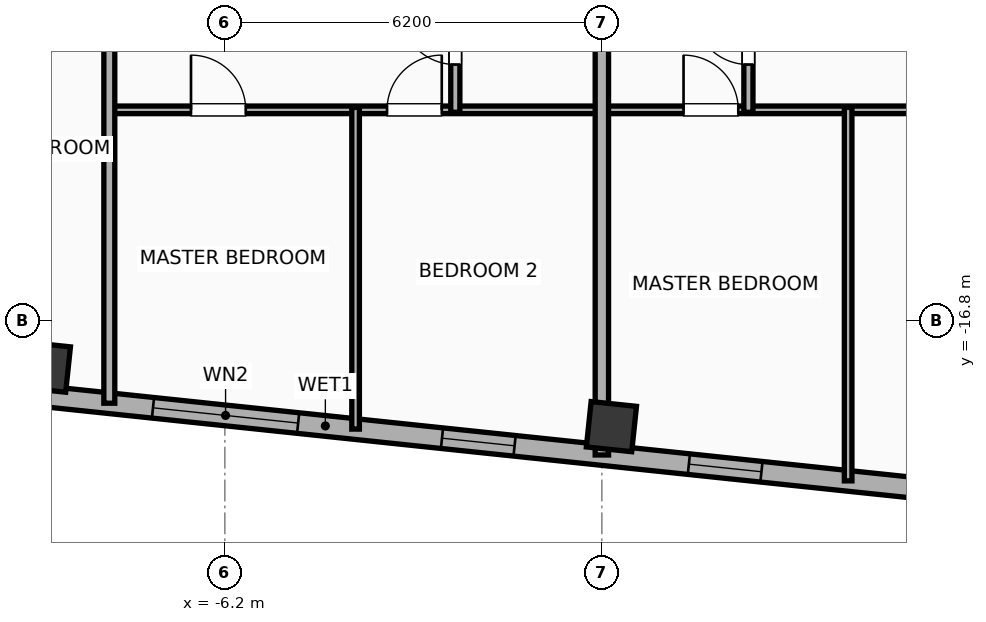
"""IFC4 building model, lengths in metres.
Left out: names, types, materials, properties, quantities, classifications, styles, units other than length and angle.
Written with IfcOpenShell. Run it as: python <this file> out.ifc"""

import sys

from ifc_helpers import new_model, si_unit, direction, frame, frame_2d, origin, origin_2d, place, context, subcontext, project, spatial, rectangle, hollow_rectangle, extrude, element, fill, save


model = new_model("IFC4")
c1 = context("Model", 3, precision=1e-05, world=origin(), true_north=direction((0.0, 1.0)))
c2 = subcontext(c1, "Body", "Model", "MODEL_VIEW")
j1 = project(units=[si_unit("LENGTHUNIT", "METRE"), si_unit("PLANEANGLEUNIT", "RADIAN")], contexts=[c1])
p1 = place(None, origin())
s1 = spatial("IfcSite", under=j1, at=p1, CompositionType="ELEMENT")
p2 = place(p1, origin())
s2 = spatial("IfcBuilding", under=s1, at=p2, CompositionType="ELEMENT")
p3 = place(p2, frame((0.0, 0.0, 271.7)))
s3 = spatial("IfcBuildingStorey", under=s2, at=p3, CompositionType="ELEMENT", Elevation=271.7)
for number, where, z_axis, x_axis in (
    (1, (-9.152, -17.561, 0.0), (0.0, 0.0, 1.0), (0.995, -0.105, 0.0)),
    (2, (0.157, -18.54, 0.0), (0.0, 0.0, 1.0), (0.995, -0.105, 0.0)),
):
    element("IfcColumn", number, at=place(p3, frame(where, z_axis=z_axis, x_axis=x_axis)), inside=s3, PredefinedType="COLUMN", context=c2, shape_type="SweptSolid", body=[
        extrude(hollow_rectangle(XDim=0.75, YDim=0.75, WallThickness=0.025, at=origin_2d()), origin(), (0.0, 0.0, 1.0), 3.9),
    ])
p4 = place(p3, frame((18.708, -20.972, 0.0), z_axis=(0.0, 0.0, 1.0), x_axis=(-0.994521888554, 0.104528528102, 0.0)))
e3 = element("IfcWall", 3, at=p4, inside=s3, PredefinedType="ELEMENTEDWALL", context=c2, shape_type="SweptSolid", body=[
    extrude(rectangle(XDim=46.766, YDim=0.34, at=frame_2d((23.383, 0.0))), origin(), (0.0, 0.0, 1.0), 3.65),
])
p5 = place(p4, frame((23.833, 0.0, 0.75)))
e4 = element("IfcOpeningElement", 4, at=p5, cuts=e3, PredefinedType="OPENING", context=c2, shape_type="SweptSolid", body=[
    extrude(rectangle(XDim=2.4, YDim=2.1, at=frame_2d((1.2, 1.05))), frame((0.0, 0.18, 0.0), z_axis=(0.0, -1.0, 0.0), x_axis=(1.0, 0.0, 0.0)), (0.0, 0.0, 1.0), 0.36),
])
p6 = place(p4, frame((38.622, 0.0, 0.75)))
e5 = element("IfcOpeningElement", 5, at=p6, cuts=e3, PredefinedType="OPENING", context=c2, shape_type="SweptSolid", body=[
    extrude(rectangle(XDim=2.4, YDim=2.1, at=frame_2d((1.2, 1.05))), frame((0.0, 0.18, 0.0), z_axis=(0.0, -1.0, 0.0), x_axis=(1.0, 0.0, 0.0)), (0.0, 0.0, 1.0), 0.36),
])
p7 = place(p4, frame((44.402, 0.0, 0.75)))
e6 = element("IfcOpeningElement", 6, at=p7, cuts=e3, PredefinedType="OPENING", context=c2, shape_type="SweptSolid", body=[
    extrude(rectangle(XDim=1.2, YDim=2.05, at=frame_2d((0.6, 1.025))), frame((0.0, 0.18, 0.0), z_axis=(0.0, -1.0, 0.0), x_axis=(1.0, 0.0, 0.0)), (0.0, 0.0, 1.0), 0.36),
])
p8 = place(p4, frame((42.419, 0.0, 0.75)))
e7 = element("IfcOpeningElement", 7, at=p8, cuts=e3, PredefinedType="OPENING", context=c2, shape_type="SweptSolid", body=[
    extrude(rectangle(XDim=1.2, YDim=2.05, at=frame_2d((0.6, 1.025))), frame((0.0, 0.18, 0.0), z_axis=(0.0, -1.0, 0.0), x_axis=(1.0, 0.0, 0.0)), (0.0, 0.0, 1.0), 0.36),
])
p9 = place(p4, frame((34.933, 0.0, 0.75)))
e8 = element("IfcOpeningElement", 8, at=p9, cuts=e3, PredefinedType="OPENING", context=c2, shape_type="SweptSolid", body=[
    extrude(rectangle(XDim=1.2, YDim=2.05, at=frame_2d((0.6, 1.025))), frame((0.0, 0.18, 0.0), z_axis=(0.0, -1.0, 0.0), x_axis=(1.0, 0.0, 0.0)), (0.0, 0.0, 1.0), 0.36),
])
p10 = place(p4, frame((28.692, 0.0, 0.75)))
e9 = element("IfcOpeningElement", 9, at=p10, cuts=e3, PredefinedType="OPENING", context=c2, shape_type="SweptSolid", body=[
    extrude(rectangle(XDim=1.2, YDim=2.05, at=frame_2d((0.6, 1.025))), frame((0.0, 0.18, 0.0), z_axis=(0.0, -1.0, 0.0), x_axis=(1.0, 0.0, 0.0)), (0.0, 0.0, 1.0), 0.36),
])
p11 = place(p4, frame((30.957, 0.0, 0.75)))
e10 = element("IfcOpeningElement", 10, at=p11, cuts=e3, PredefinedType="OPENING", context=c2, shape_type="SweptSolid", body=[
    extrude(rectangle(XDim=1.2, YDim=2.05, at=frame_2d((0.6, 1.025))), frame((0.0, 0.18, 0.0), z_axis=(0.0, -1.0, 0.0), x_axis=(1.0, 0.0, 0.0)), (0.0, 0.0, 1.0), 0.36),
])
p12 = place(p4, frame((7.492, 0.0, 0.75)))
e11 = element("IfcOpeningElement", 11, at=p12, cuts=e3, PredefinedType="OPENING", context=c2, shape_type="SweptSolid", body=[
    extrude(rectangle(XDim=1.2, YDim=2.05, at=frame_2d((0.6, 1.025))), frame((0.0, 0.18, 0.0), z_axis=(0.0, -1.0, 0.0), x_axis=(1.0, 0.0, 0.0)), (0.0, 0.0, 1.0), 0.36),
])
p13 = place(p4, frame((4.141, 0.0, 0.75)))
e12 = element("IfcOpeningElement", 12, at=p13, cuts=e3, PredefinedType="OPENING", context=c2, shape_type="SweptSolid", body=[
    extrude(rectangle(XDim=1.2, YDim=2.05, at=frame_2d((0.6, 1.025))), frame((0.0, 0.18, 0.0), z_axis=(0.0, -1.0, 0.0), x_axis=(1.0, 0.0, 0.0)), (0.0, 0.0, 1.0), 0.36),
])
p14 = place(p4, frame((1.36, 0.0, 0.75)))
e13 = element("IfcOpeningElement", 13, at=p14, cuts=e3, PredefinedType="OPENING", context=c2, shape_type="SweptSolid", body=[
    extrude(rectangle(XDim=1.2, YDim=2.05, at=frame_2d((0.6, 1.025))), frame((0.0, 0.18, 0.0), z_axis=(0.0, -1.0, 0.0), x_axis=(1.0, 0.0, 0.0)), (0.0, 0.0, 1.0), 0.36),
])
p15 = place(p4, frame((20.254, 0.0, 0.75)))
e14 = element("IfcOpeningElement", 14, at=p15, cuts=e3, PredefinedType="OPENING", context=c2, shape_type="SweptSolid", body=[
    extrude(rectangle(XDim=1.2, YDim=2.05, at=frame_2d((0.6, 1.025))), frame((0.0, 0.18, 0.0), z_axis=(0.0, -1.0, 0.0), x_axis=(1.0, 0.0, 0.0)), (0.0, 0.0, 1.0), 0.36),
])
p16 = place(p4, frame((16.172, 0.0, 0.75)))
e15 = element("IfcOpeningElement", 15, at=p16, cuts=e3, PredefinedType="OPENING", context=c2, shape_type="SweptSolid", body=[
    extrude(rectangle(XDim=1.2, YDim=2.05, at=frame_2d((0.6, 1.025))), frame((0.0, 0.18, 0.0), z_axis=(0.0, -1.0, 0.0), x_axis=(1.0, 0.0, 0.0)), (0.0, 0.0, 1.0), 0.36),
])
p17 = place(p4, frame((12.11, 0.0, 0.75)))
e16 = element("IfcOpeningElement", 16, at=p17, cuts=e3, PredefinedType="OPENING", context=c2, shape_type="SweptSolid", body=[
    extrude(rectangle(XDim=1.2, YDim=2.05, at=frame_2d((0.6, 1.025))), frame((0.0, 0.18, 0.0), z_axis=(0.0, -1.0, 0.0), x_axis=(1.0, 0.0, 0.0)), (0.0, 0.0, 1.0), 0.36),
])
p18 = place(p3, frame((-8.08, -13.33, 0.0), z_axis=(0.0, 0.0, 1.0), x_axis=(1.0, 0.0, 0.0)))
e17 = element("IfcWall", 17, at=p18, inside=s3, PredefinedType="PARTITIONING", context=c2, shape_type="SweptSolid", body=[
    extrude(rectangle(XDim=8.06, YDim=0.125, at=frame_2d((4.03, 0.0))), origin(), (0.0, 0.0, 1.0), 3.65),
])
p19 = place(p18, frame((1.323, 0.0, 0.0)))
e18 = element("IfcOpeningElement", 18, at=p19, cuts=e17, PredefinedType="OPENING", context=c2, shape_type="SweptSolid", body=[
    extrude(rectangle(XDim=0.9, YDim=2.05, at=frame_2d((0.45, 1.025))), frame((0.0, 0.073, 0.0), z_axis=(0.0, -1.0, 0.0), x_axis=(1.0, 0.0, 0.0)), (0.0, 0.0, 1.0), 0.145),
])
p20 = place(p18, frame((4.547, 0.0, 0.0)))
e19 = element("IfcOpeningElement", 19, at=p20, cuts=e17, PredefinedType="OPENING", context=c2, shape_type="SweptSolid", body=[
    extrude(rectangle(XDim=0.9, YDim=2.05, at=frame_2d((0.45, 1.025))), frame((0.0, 0.073, 0.0), z_axis=(0.0, -1.0, 0.0), x_axis=(1.0, 0.0, 0.0)), (0.0, 0.0, 1.0), 0.145),
])
p21 = place(p3, frame((-2.41, -13.37, 0.0), z_axis=(0.0, 0.0, 1.0), x_axis=(0.0, 1.0, 0.0)))
e20 = element("IfcWall", 20, at=p21, inside=s3, PredefinedType="PLUMBINGWALL", context=c2, shape_type="SweptSolid", body=[
    extrude(rectangle(XDim=2.47, YDim=0.15, at=frame_2d((1.235, 0.0))), origin(), (0.0, 0.0, 1.0), 3.65),
])
p22 = place(p21, frame((0.785, 0.0, 0.0)))
e21 = element("IfcOpeningElement", 21, at=p22, cuts=e20, PredefinedType="OPENING", context=c2, shape_type="SweptSolid", body=[
    extrude(rectangle(XDim=0.9, YDim=2.05, at=frame_2d((0.45, 1.025))), frame((0.0, 0.085, 0.0), z_axis=(0.0, -1.0, 0.0), x_axis=(1.0, 0.0, 0.0)), (0.0, 0.0, 1.0), 0.17),
])
p23 = place(p3, frame((-4.05, -18.58, 0.0), z_axis=(0.0, 0.0, 1.0), x_axis=(0.0, 1.0, 0.0)))
e22 = element("IfcWall", 22, at=p23, inside=s3, PredefinedType="PARTITIONING", context=c2, shape_type="SweptSolid", body=[
    extrude(rectangle(XDim=5.29, YDim=0.125, at=frame_2d((2.645, 0.0))), origin(), (0.0, 0.0, 1.0), 3.65),
])
p24 = place(p3, frame((-8.1, -18.155, 0.0), z_axis=(0.0, 0.0, 1.0), x_axis=(0.0, 1.0, 0.0)))
e23 = element("IfcWall", 23, at=p24, inside=s3, PredefinedType="PARTITIONING", context=c2, shape_type="SweptSolid", body=[
    extrude(rectangle(XDim=9.665, YDim=0.18, at=frame_2d((4.832, 0.0))), origin(), (0.0, 0.0, 1.0), 3.65),
])
p25 = place(p24, frame((8.414, 0.0, 0.0)))
e24 = element("IfcOpeningElement", 24, at=p25, cuts=e23, PredefinedType="OPENING", context=c2, shape_type="SweptSolid", body=[
    extrude(rectangle(XDim=0.9, YDim=2.05, at=frame_2d((0.45, 1.025))), frame((0.0, 0.1, 0.0), z_axis=(0.0, -1.0, 0.0), x_axis=(1.0, 0.0, 0.0)), (0.0, 0.0, 1.0), 0.2),
])
p26 = place(p3, frame((0.02, -13.33, 0.0), z_axis=(0.0, 0.0, 1.0), x_axis=(1.0, 0.0, 0.0)))
e25 = element("IfcWall", 25, at=p26, inside=s3, PredefinedType="PARTITIONING", context=c2, shape_type="SweptSolid", body=[
    extrude(rectangle(XDim=7.992, YDim=0.125, at=frame_2d((3.996, 0.0))), origin(), (0.0, 0.0, 1.0), 3.65),
])
p27 = place(p26, frame((1.323, 0.0, 0.0)))
e26 = element("IfcOpeningElement", 26, at=p27, cuts=e25, PredefinedType="OPENING", context=c2, shape_type="SweptSolid", body=[
    extrude(rectangle(XDim=0.9, YDim=2.05, at=frame_2d((0.45, 1.025))), frame((0.0, 0.073, 0.0), z_axis=(0.0, -1.0, 0.0), x_axis=(1.0, 0.0, 0.0)), (0.0, 0.0, 1.0), 0.145),
])
p28 = place(p26, frame((5.837, 0.0, 0.0)))
e27 = element("IfcOpeningElement", 27, at=p28, cuts=e25, PredefinedType="OPENING", context=c2, shape_type="SweptSolid", body=[
    extrude(rectangle(XDim=0.9, YDim=2.05, at=frame_2d((0.45, 1.025))), frame((0.0, 0.073, 0.0), z_axis=(0.0, -1.0, 0.0), x_axis=(1.0, 0.0, 0.0)), (0.0, 0.0, 1.0), 0.145),
])
p29 = place(p3, frame((2.41, -13.37, 0.0), z_axis=(0.0, 0.0, 1.0), x_axis=(0.0, 1.0, 0.0)))
e28 = element("IfcWall", 28, at=p29, inside=s3, PredefinedType="PLUMBINGWALL", context=c2, shape_type="SweptSolid", body=[
    extrude(rectangle(XDim=2.47, YDim=0.15, at=frame_2d((1.235, 0.0))), origin(), (0.0, 0.0, 1.0), 3.09),
])
p30 = place(p29, frame((0.785, 0.0, 0.0)))
e29 = element("IfcOpeningElement", 29, at=p30, cuts=e28, PredefinedType="OPENING", context=c2, shape_type="SweptSolid", body=[
    extrude(rectangle(XDim=0.9, YDim=2.05, at=frame_2d((0.45, 1.025))), frame((0.0, 0.085, 0.0), z_axis=(0.0, -1.0, 0.0), x_axis=(1.0, 0.0, 0.0)), (0.0, 0.0, 1.0), 0.17),
])
p31 = place(p3, frame((4.05, -19.432, 0.0), z_axis=(0.0, 0.0, 1.0), x_axis=(0.0, 1.0, 0.0)))
e30 = element("IfcWall", 30, at=p31, inside=s3, PredefinedType="PARTITIONING", context=c2, shape_type="SweptSolid", body=[
    extrude(rectangle(XDim=6.142, YDim=0.125, at=frame_2d((3.071, 0.0))), origin(), (0.0, 0.0, 1.0), 3.65),
])
p32 = place(p3, frame((0.0, -19.006, 0.0), z_axis=(0.0, 0.0, 1.0), x_axis=(0.0, 1.0, 0.0)))
e31 = element("IfcWall", 31, at=p32, inside=s3, PredefinedType="PARTITIONING", context=c2, shape_type="SweptSolid", body=[
    extrude(rectangle(XDim=10.516, YDim=0.22, at=frame_2d((5.258, 0.0))), origin(), (0.0, 0.0, 1.0), 3.65),
])
p33 = place(p5, origin())
e32 = element("IfcWindow", 32, at=p33, inside=s3, PartitioningType="SINGLE_PANEL", PredefinedType="WINDOW", context=c2, shape_type="SweptSolid", body=[
    extrude(rectangle(XDim=2.4, YDim=2.1, at=frame_2d((1.2, 1.05))), frame((0.0, 0.03, 0.0), z_axis=(0.0, -1.0, 0.0), x_axis=(1.0, 0.0, 0.0)), (0.0, 0.0, 1.0), 0.06),
])
fill(e4, e32)
p34 = place(p15, origin())
e33 = element("IfcWindow", 33, at=p34, inside=s3, PartitioningType="SINGLE_PANEL", PredefinedType="WINDOW", context=c2, shape_type="SweptSolid", body=[
    extrude(rectangle(XDim=1.2, YDim=2.05, at=frame_2d((0.6, 1.025))), frame((0.0, 0.03, 0.0), z_axis=(0.0, -1.0, 0.0), x_axis=(1.0, 0.0, 0.0)), (0.0, 0.0, 1.0), 0.06),
])
fill(e14, e33)
p35 = place(p16, origin())
e34 = element("IfcWindow", 34, at=p35, inside=s3, PartitioningType="SINGLE_PANEL", PredefinedType="WINDOW", context=c2, shape_type="SweptSolid", body=[
    extrude(rectangle(XDim=1.2, YDim=2.05, at=frame_2d((0.6, 1.025))), frame((0.0, 0.03, 0.0), z_axis=(0.0, -1.0, 0.0), x_axis=(1.0, 0.0, 0.0)), (0.0, 0.0, 1.0), 0.06),
])
fill(e15, e34)
p36 = place(p19, origin())
e35 = element("IfcDoor", 35, at=p36, inside=s3, OperationType="SINGLE_SWING_LEFT", PredefinedType="DOOR", context=c2, shape_type="SweptSolid", body=[
    extrude(rectangle(XDim=0.9, YDim=2.05, at=frame_2d((0.45, 1.025))), frame((0.0, 0.025, 0.0), z_axis=(0.0, -1.0, 0.0), x_axis=(1.0, 0.0, 0.0)), (0.0, 0.0, 1.0), 0.05),
])
fill(e18, e35)
p37 = place(p20, origin())
e36 = element("IfcDoor", 36, at=p37, inside=s3, OperationType="SINGLE_SWING_RIGHT", PredefinedType="DOOR", context=c2, shape_type="SweptSolid", body=[
    extrude(rectangle(XDim=0.9, YDim=2.05, at=frame_2d((0.45, 1.025))), frame((0.0, 0.025, 0.0), z_axis=(0.0, -1.0, 0.0), x_axis=(1.0, 0.0, 0.0)), (0.0, 0.0, 1.0), 0.05),
])
fill(e19, e36)
p38 = place(p22, origin())
e37 = element("IfcDoor", 37, at=p38, inside=s3, OperationType="SINGLE_SWING_RIGHT", PredefinedType="DOOR", context=c2, shape_type="SweptSolid", body=[
    extrude(rectangle(XDim=0.9, YDim=2.05, at=frame_2d((0.45, 1.025))), frame((0.0, 0.025, 0.0), z_axis=(0.0, -1.0, 0.0), x_axis=(1.0, 0.0, 0.0)), (0.0, 0.0, 1.0), 0.05),
])
fill(e21, e37)
p39 = place(p27, origin())
e38 = element("IfcDoor", 38, at=p39, inside=s3, OperationType="SINGLE_SWING_LEFT", PredefinedType="DOOR", context=c2, shape_type="SweptSolid", body=[
    extrude(rectangle(XDim=0.9, YDim=2.05, at=frame_2d((0.45, 1.025))), frame((0.0, 0.025, 0.0), z_axis=(0.0, -1.0, 0.0), x_axis=(1.0, 0.0, 0.0)), (0.0, 0.0, 1.0), 0.05),
])
fill(e26, e38)
p40 = place(p30, origin())
e39 = element("IfcDoor", 39, at=p40, inside=s3, OperationType="SINGLE_SWING_RIGHT", PredefinedType="DOOR", context=c2, shape_type="SweptSolid", body=[
    extrude(rectangle(XDim=0.9, YDim=2.05, at=frame_2d((0.45, 1.025))), frame((0.0, 0.025, 0.0), z_axis=(0.0, -1.0, 0.0), x_axis=(1.0, 0.0, 0.0)), (0.0, 0.0, 1.0), 0.05),
])
fill(e29, e39)
save(model, sys.argv[1])
